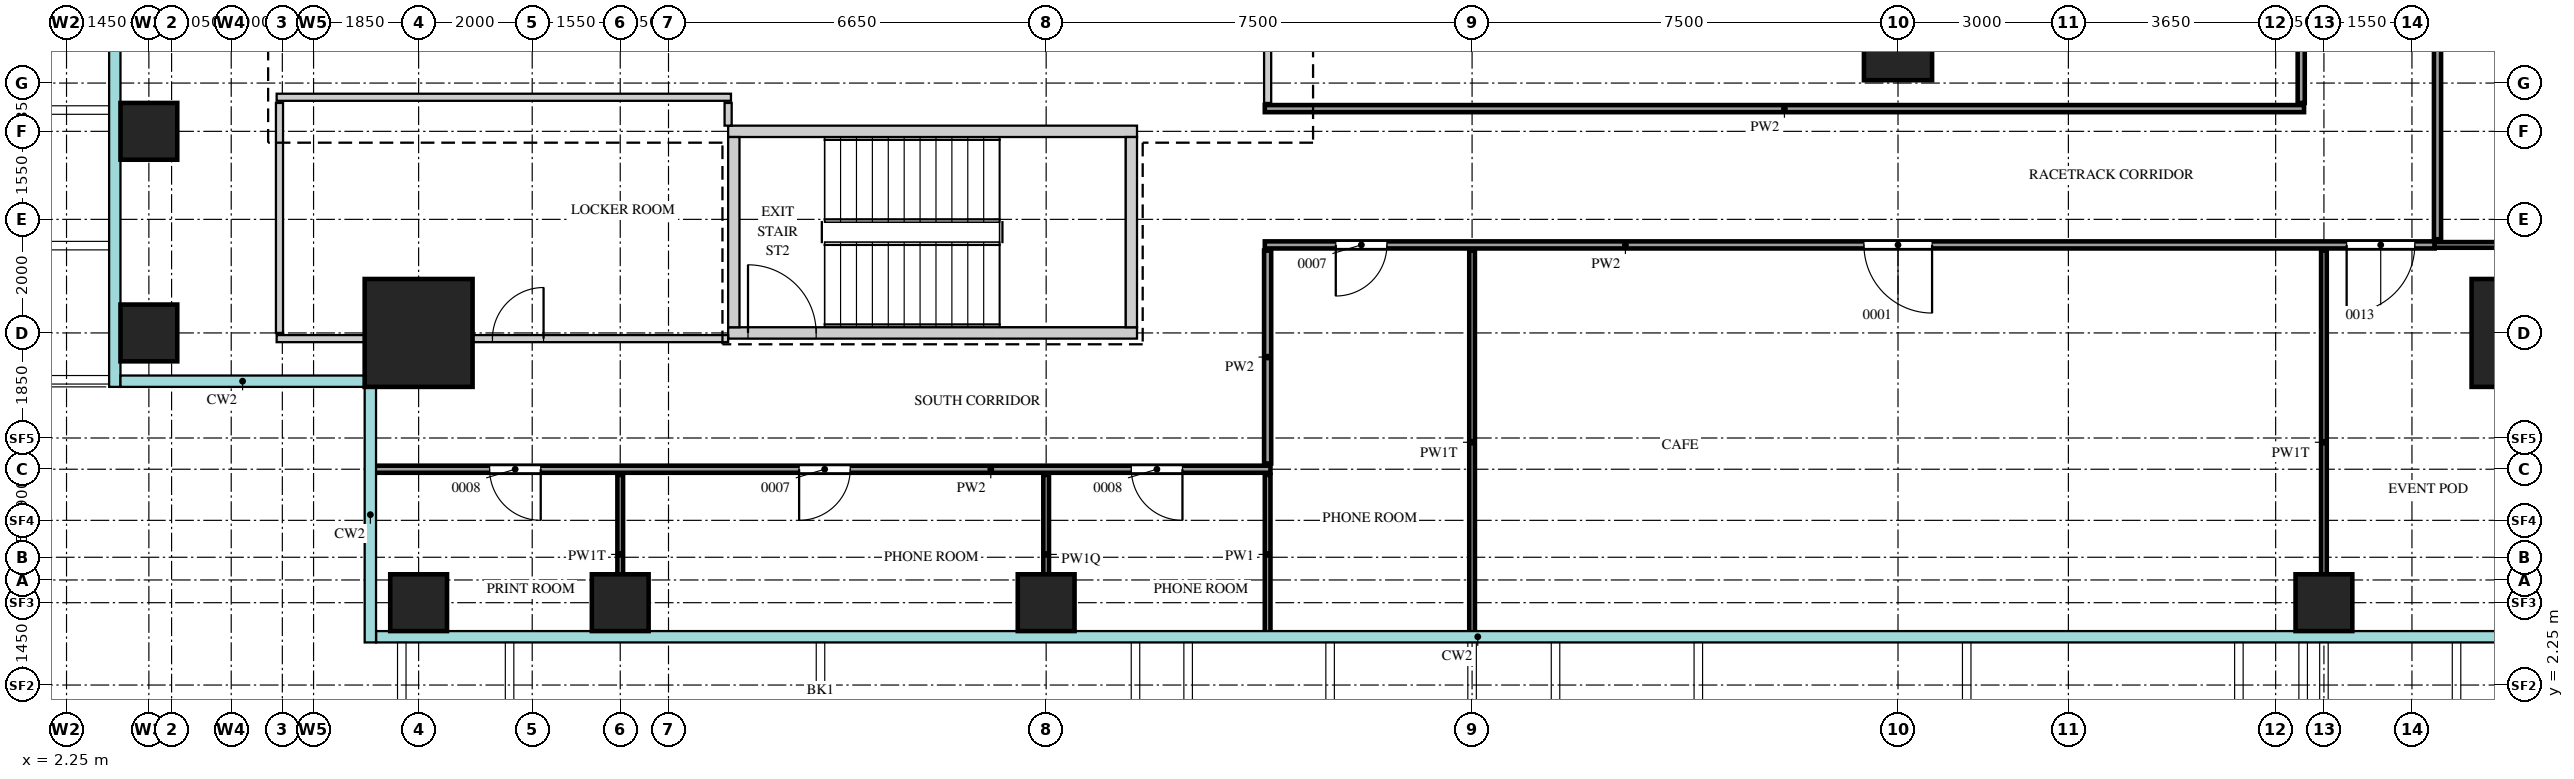
"""IFC4 building model, lengths in metres.
Left out: names, types, materials, properties, quantities, classifications, styles, units other than length and angle.
Written with IfcOpenShell. Run it as: python <this file> out.ifc"""

import sys

from ifc_helpers import new_model, si_unit, direction, frame, frame_2d, origin, origin_2d, place, context, subcontext, project, spatial, rectangle, extrude, source, transform, mapped, element, fill, save


model = new_model("IFC4")
c1 = context("Model", 3, precision=1e-05, world=origin(), true_north=direction((0.0, 1.0)))
c2 = subcontext(c1, "Body", "Model", "MODEL_VIEW")
j1 = project(units=[si_unit("LENGTHUNIT", "METRE"), si_unit("PLANEANGLEUNIT", "RADIAN")], contexts=[c1])
p1 = place(None, origin())
s1 = spatial("IfcSite", under=j1, at=p1, CompositionType="ELEMENT")
p2 = place(p1, origin())
s2 = spatial("IfcBuilding", under=s1, at=p2, CompositionType="ELEMENT")
p3 = place(p2, frame((0.0, 0.0, 188.7)))
s3 = spatial("IfcBuildingStorey", under=s2, at=p3, CompositionType="ELEMENT", Elevation=188.7)
m1 = source(origin(), c2, "Body", "SweptSolid", [
    extrude(rectangle(XDim=7.2, YDim=0.2, at=frame_2d((3.6, 0.0))), origin(), (0.0, 0.0, 1.0), 3.75),
])
p4 = place(p3, frame((13.9, 12.0, 0.0), z_axis=(0.0, 0.0, 1.0), x_axis=(1.0, 0.0, 0.0)))
e1 = element("IfcWall", 1, at=p4, inside=s3, PredefinedType="SHEAR", context=c2, shape_type="MappedRepresentation", body=[
    mapped(m1, transform((0.0, 0.0, 0.0))),
])
p5 = place(p3, frame((13.9, 8.45, 0.0), z_axis=(0.0, 0.0, 1.0), x_axis=(1.0, 0.0, 0.0)))
e2 = element("IfcWall", 2, at=p5, inside=s3, PredefinedType="SHEAR", context=c2, shape_type="MappedRepresentation", body=[
    mapped(m1, transform((0.0, 0.0, 0.0))),
])
m2 = source(origin(), c2, "Body", "SweptSolid", [
    extrude(rectangle(XDim=1.2, YDim=2.1, at=frame_2d((0.6, 1.05))), frame((0.0, 0.11, 0.0), z_axis=(0.0, -1.0, 0.0), x_axis=(1.0, 0.0, 0.0)), (0.0, 0.0, 1.0), 0.22),
])
p6 = place(p5, frame((0.35, 0.0, 0.0)))
e3 = element("IfcOpeningElement", 3, at=p6, cuts=e2, PredefinedType="OPENING", context=c2, shape_type="MappedRepresentation", body=[
    mapped(m2, transform((0.0, 0.0, 0.0))),
])
m3 = source(origin(), c2, "Body", "SweptSolid", [
    extrude(rectangle(XDim=3.35, YDim=0.2, at=frame_2d((1.675, 0.0))), origin(), (0.0, 0.0, 1.0), 3.75),
])
for number, where, z_axis, x_axis in (
    (4, (21.0, 8.55, 0.0), (0.0, 0.0, 1.0), (0.0, 1.0, 0.0)),
    (5, (14.0, 8.55, 0.0), (0.0, 0.0, 1.0), (0.0, 1.0, 0.0)),
):
    element("IfcWall", number, at=place(p3, frame(where, z_axis=z_axis, x_axis=x_axis)), inside=s3, PredefinedType="SHEAR", context=c2, shape_type="MappedRepresentation", body=[
        mapped(m3, transform((0.0, 0.0, 0.0))),
    ])
m4 = source(origin(), c2, "Body", "SweptSolid", [
    extrude(rectangle(XDim=1.9, YDim=1.9, at=origin_2d()), origin(), (0.0, 0.0, 1.0), 4.0),
])
for number, where, z_axis, x_axis in (
    (6, (45.55, 8.45, 0.0), (0.0, 0.0, 1.0), (1.0, 0.0, 0.0)),
    (7, (8.45, 8.45, 0.0), (0.0, 0.0, 1.0), (1.0, 0.0, 0.0)),
):
    element("IfcColumn", number, at=place(p3, frame(where, z_axis=z_axis, x_axis=x_axis)), inside=s3, PredefinedType="COLUMN", context=c2, shape_type="MappedRepresentation", body=[
        mapped(m4, transform((0.0, 0.0, 0.0))),
    ])
m5 = source(origin(), c2, "Body", "SweptSolid", [
    extrude(rectangle(XDim=1.0, YDim=1.0, at=origin_2d()), origin(), (0.0, 0.0, 1.0), 3.75),
])
for number, where, z_axis, x_axis in (
    (8, (8.45, 3.7, 0.0), (0.0, 0.0, 1.0), (1.0, 0.0, 0.0)),
    (9, (12.0, 3.7, 0.0), (0.0, 0.0, 1.0), (1.0, 0.0, 0.0)),
    (10, (19.5, 3.7, 0.0), (0.0, 0.0, 1.0), (1.0, 0.0, 0.0)),
    (11, (42.0, 3.7, 0.0), (0.0, 0.0, 1.0), (1.0, 0.0, 0.0)),
    (12, (3.7, 8.45, 0.0), (0.0, 0.0, 1.0), (1.0, 0.0, 0.0)),
    (13, (3.7, 12.0, 0.0), (0.0, 0.0, 1.0), (1.0, 0.0, 0.0)),
):
    element("IfcColumn", number, at=place(p3, frame(where, z_axis=z_axis, x_axis=x_axis)), inside=s3, PredefinedType="COLUMN", context=c2, shape_type="MappedRepresentation", body=[
        mapped(m5, transform((0.0, 0.0, 0.0))),
    ])
m6 = source(origin(), c2, "Body", "SweptSolid", [
    extrude(rectangle(XDim=1.2, YDim=1.2, at=origin_2d()), origin(), (0.0, 0.0, 1.0), 3.75),
])
p7 = place(p3, frame((34.5, 13.5, 0.0), z_axis=(0.0, 0.0, 1.0), x_axis=(1.0, 0.0, 0.0)))
e14 = element("IfcColumn", 14, at=p7, inside=s3, PredefinedType="COLUMN", context=c2, shape_type="MappedRepresentation", body=[
    mapped(m6, transform((0.0, 0.0, 0.0))),
])
m7 = source(origin(), c2, "Body", "SweptSolid", [
    extrude(rectangle(XDim=2.8, YDim=0.1, at=frame_2d((1.4, 0.0))), origin(), (0.0, 0.0, 1.0), 3.3),
])
p8 = place(p3, frame((12.0, 3.15, 0.0), z_axis=(0.0, 0.0, 1.0), x_axis=(0.0, 1.0, 0.0)))
e15 = element("IfcWall", 15, at=p8, inside=s3, PredefinedType="PARTITIONING", context=c2, shape_type="MappedRepresentation", body=[
    mapped(m7, transform((0.0, 0.0, 0.0))),
])
m8 = source(origin(), c2, "Body", "SweptSolid", [
    extrude(rectangle(XDim=2.8, YDim=0.1, at=frame_2d((1.4, 0.0))), origin(), (0.0, 0.0, 1.0), 3.42),
])
p9 = place(p3, frame((19.5, 3.15, 0.0), z_axis=(0.0, 0.0, 1.0), x_axis=(0.0, 1.0, 0.0)))
e16 = element("IfcWall", 16, at=p9, inside=s3, PredefinedType="PARTITIONING", context=c2, shape_type="MappedRepresentation", body=[
    mapped(m8, transform((0.0, 0.0, 0.0))),
])
m9 = source(origin(), c2, "Body", "SweptSolid", [
    extrude(rectangle(XDim=2.8, YDim=0.1, at=frame_2d((1.4, 0.0))), origin(), (0.0, 0.0, 1.0), 3.8),
])
p10 = place(p3, frame((23.4, 3.15, 0.0), z_axis=(0.0, 0.0, 1.0), x_axis=(0.0, 1.0, 0.0)))
e17 = element("IfcWall", 17, at=p10, inside=s3, PredefinedType="PARTITIONING", context=c2, shape_type="MappedRepresentation", body=[
    mapped(m9, transform((0.0, 0.0, 0.0))),
])
m10 = source(origin(), c2, "Body", "SweptSolid", [
    extrude(rectangle(XDim=6.75, YDim=0.1, at=frame_2d((3.375, 0.0))), origin(), (0.0, 0.0, 1.0), 3.3),
])
for number, where, z_axis, x_axis in (
    (18, (27.0, 3.15, 0.0), (0.0, 0.0, 1.0), (0.0, 1.0, 0.0)),
    (19, (42.0, 3.15, 0.0), (0.0, 0.0, 1.0), (0.0, 1.0, 0.0)),
):
    element("IfcWall", number, at=place(p3, frame(where, z_axis=z_axis, x_axis=x_axis)), inside=s3, PredefinedType="PARTITIONING", context=c2, shape_type="MappedRepresentation", body=[
        mapped(m10, transform((0.0, 0.0, 0.0))),
    ])
m11 = source(origin(), c2, "Body", "SweptSolid", [
    extrude(rectangle(XDim=15.8, YDim=0.125, at=frame_2d((7.9, 0.0))), origin(), (0.0, 0.0, 1.0), 3.8),
])
p11 = place(p3, frame((7.65, 6.05, 0.0), z_axis=(0.0, 0.0, 1.0), x_axis=(1.0, 0.0, 0.0)))
e20 = element("IfcWall", 20, at=p11, inside=s3, PredefinedType="PARTITIONING", context=c2, shape_type="MappedRepresentation", body=[
    mapped(m11, transform((0.0, 0.0, 0.0))),
])
m12 = source(origin(), c2, "Body", "SweptSolid", [
    extrude(rectangle(XDim=0.9, YDim=2.1, at=frame_2d((0.45, 1.05))), frame((0.0, 0.073, 0.0), z_axis=(0.0, -1.0, 0.0), x_axis=(1.0, 0.0, 0.0)), (0.0, 0.0, 1.0), 0.145),
])
p12 = place(p11, frame((2.05, 0.0, 0.0)))
e21 = element("IfcOpeningElement", 21, at=p12, cuts=e20, PredefinedType="OPENING", context=c2, shape_type="MappedRepresentation", body=[
    mapped(m12, transform((0.0, 0.0, 0.0))),
])
p13 = place(p11, frame((7.5, 0.0, 0.0)))
e22 = element("IfcOpeningElement", 22, at=p13, cuts=e20, PredefinedType="OPENING", context=c2, shape_type="MappedRepresentation", body=[
    mapped(m12, transform((0.0, 0.0, 0.0))),
])
p14 = place(p11, frame((13.35, 0.0, 0.0)))
e23 = element("IfcOpeningElement", 23, at=p14, cuts=e20, PredefinedType="OPENING", context=c2, shape_type="MappedRepresentation", body=[
    mapped(m12, transform((0.0, 0.0, 0.0))),
])
m13 = source(origin(), c2, "Body", "SweptSolid", [
    extrude(rectangle(XDim=3.75, YDim=0.125, at=frame_2d((1.875, 0.0))), origin(), (0.0, 0.0, 1.0), 3.8),
])
p15 = place(p3, frame((23.4, 6.15, 0.0), z_axis=(0.0, 0.0, 1.0), x_axis=(0.0, 1.0, 0.0)))
e24 = element("IfcWall", 24, at=p15, inside=s3, PredefinedType="PARTITIONING", context=c2, shape_type="MappedRepresentation", body=[
    mapped(m13, transform((0.0, 0.0, 0.0))),
])
m14 = source(origin(), c2, "Body", "SweptSolid", [
    extrude(rectangle(XDim=7.95, YDim=0.125, at=frame_2d((3.975, 0.0))), origin(), (0.0, 0.0, 1.0), 3.25),
])
p16 = place(p3, frame((5.95, 8.35, 0.0), z_axis=(0.0, 0.0, 1.0), x_axis=(1.0, 0.0, 0.0)))
e25 = element("IfcWall", 25, at=p16, inside=s3, PredefinedType="PARTITIONING", context=c2, shape_type="MappedRepresentation", body=[
    mapped(m14, transform((0.0, 0.0, 0.0))),
])
p17 = place(p16, frame((3.8, 0.0, 0.0)))
e26 = element("IfcOpeningElement", 26, at=p17, cuts=e25, PredefinedType="OPENING", context=c2, shape_type="MappedRepresentation", body=[
    mapped(m12, transform((0.0, 0.0, 0.0))),
])
m15 = source(origin(), c2, "Body", "SweptSolid", [
    extrude(rectangle(XDim=4.05, YDim=0.125, at=frame_2d((2.025, 0.0))), origin(), (0.0, 0.0, 1.0), 3.8),
])
p18 = place(p3, frame((6.0, 8.45, 0.0), z_axis=(0.0, 0.0, 1.0), x_axis=(0.0, 1.0, 0.0)))
e27 = element("IfcWall", 27, at=p18, inside=s3, PredefinedType="PARTITIONING", context=c2, shape_type="MappedRepresentation", body=[
    mapped(m15, transform((0.0, 0.0, 0.0))),
])
m16 = source(origin(), c2, "Body", "SweptSolid", [
    extrude(rectangle(XDim=20.6, YDim=0.125, at=frame_2d((10.3, 0.0))), origin(), (0.0, 0.0, 1.0), 3.8),
])
p19 = place(p3, frame((23.35, 10.0, 0.0), z_axis=(0.0, 0.0, 1.0), x_axis=(1.0, 0.0, 0.0)))
e28 = element("IfcWall", 28, at=p19, inside=s3, PredefinedType="PARTITIONING", context=c2, shape_type="MappedRepresentation", body=[
    mapped(m16, transform((0.0, 0.0, 0.0))),
])
p20 = place(p19, frame((1.25, 0.0, 0.0)))
e29 = element("IfcOpeningElement", 29, at=p20, cuts=e28, PredefinedType="OPENING", context=c2, shape_type="MappedRepresentation", body=[
    mapped(m12, transform((0.0, 0.0, 0.0))),
])
m17 = source(origin(), c2, "Body", "SweptSolid", [
    extrude(rectangle(XDim=1.2, YDim=2.1, at=frame_2d((0.6, 1.05))), frame((0.0, 0.073, 0.0), z_axis=(0.0, -1.0, 0.0), x_axis=(1.0, 0.0, 0.0)), (0.0, 0.0, 1.0), 0.145),
])
p21 = place(p19, frame((10.55, 0.0, 0.0)))
e30 = element("IfcOpeningElement", 30, at=p21, cuts=e28, PredefinedType="OPENING", context=c2, shape_type="MappedRepresentation", body=[
    mapped(m17, transform((0.0, 0.0, 0.0))),
])
p22 = place(p19, frame((19.05, 0.0, 0.0)))
e31 = element("IfcOpeningElement", 31, at=p22, cuts=e28, PredefinedType="OPENING", context=c2, shape_type="MappedRepresentation", body=[
    mapped(m17, transform((0.0, 0.0, 0.0))),
])
m18 = source(origin(), c2, "Body", "SweptSolid", [
    extrude(rectangle(XDim=6.9, YDim=0.1, at=frame_2d((3.45, 0.0))), origin(), (0.0, 0.0, 1.0), 3.8),
])
p23 = place(p3, frame((43.95, 10.0, 0.0), z_axis=(0.0, 0.0, 1.0), x_axis=(1.0, 0.0, 0.0)))
e32 = element("IfcWall", 32, at=p23, inside=s3, PredefinedType="PARTITIONING", context=c2, shape_type="MappedRepresentation", body=[
    mapped(m18, transform((0.0, 0.0, 0.0))),
])
m19 = source(origin(), c2, "Body", "SweptSolid", [
    extrude(rectangle(XDim=33.8, YDim=0.125, at=frame_2d((16.9, 0.0))), origin(), (0.0, 0.0, 1.0), 3.8),
])
p24 = place(p3, frame((44.0, 10.1, 0.0), z_axis=(0.0, 0.0, 1.0), x_axis=(0.0, 1.0, 0.0)))
e33 = element("IfcWall", 33, at=p24, inside=s3, PredefinedType="PARTITIONING", context=c2, shape_type="MappedRepresentation", body=[
    mapped(m19, transform((0.0, 0.0, 0.0))),
])
p25 = place(p24, frame((5.25, 0.0, 0.0)))
e34 = element("IfcOpeningElement", 34, at=p25, cuts=e33, PredefinedType="OPENING", context=c2, shape_type="MappedRepresentation", body=[
    mapped(m12, transform((0.0, 0.0, 0.0))),
])
p26 = place(p24, frame((12.55, 0.0, 0.0)))
e35 = element("IfcOpeningElement", 35, at=p26, cuts=e33, PredefinedType="OPENING", context=c2, shape_type="MappedRepresentation", body=[
    mapped(m12, transform((0.0, 0.0, 0.0))),
])
p27 = place(p24, frame((23.6, 0.0, 0.0)))
e36 = element("IfcOpeningElement", 36, at=p27, cuts=e33, PredefinedType="OPENING", context=c2, shape_type="MappedRepresentation", body=[
    mapped(m12, transform((0.0, 0.0, 0.0))),
])
p28 = place(p24, frame((32.3, 0.0, 0.0)))
e37 = element("IfcOpeningElement", 37, at=p28, cuts=e33, PredefinedType="OPENING", context=c2, shape_type="MappedRepresentation", body=[
    mapped(m12, transform((0.0, 0.0, 0.0))),
])
m20 = source(origin(), c2, "Body", "SweptSolid", [
    extrude(rectangle(XDim=0.4, YDim=0.125, at=frame_2d((0.2, 0.0))), origin(), (0.0, 0.0, 1.0), 3.8),
])
p29 = place(p3, frame((13.9, 12.1, 0.0), z_axis=(0.0, 0.0, 1.0), x_axis=(0.0, 1.0, 0.0)))
e38 = element("IfcWall", 38, at=p29, inside=s3, PredefinedType="PARTITIONING", context=c2, shape_type="MappedRepresentation", body=[
    mapped(m20, transform((0.0, 0.0, 0.0))),
])
m21 = source(origin(), c2, "Body", "SweptSolid", [
    extrude(rectangle(XDim=18.3, YDim=0.125, at=frame_2d((9.15, 0.0))), origin(), (0.0, 0.0, 1.0), 3.8),
])
p30 = place(p3, frame((23.35, 12.4, 0.0), z_axis=(0.0, 0.0, 1.0), x_axis=(1.0, 0.0, 0.0)))
e39 = element("IfcWall", 39, at=p30, inside=s3, PredefinedType="PARTITIONING", context=c2, shape_type="MappedRepresentation", body=[
    mapped(m21, transform((0.0, 0.0, 0.0))),
])
m22 = source(origin(), c2, "Body", "SweptSolid", [
    extrude(rectangle(XDim=23.4, YDim=0.125, at=frame_2d((11.7, 0.0))), origin(), (0.0, 0.0, 1.0), 3.8),
])
p31 = place(p3, frame((23.4, 12.5, 0.0), z_axis=(0.0, 0.0, 1.0), x_axis=(0.0, 1.0, 0.0)))
e40 = element("IfcWall", 40, at=p31, inside=s3, PredefinedType="PARTITIONING", context=c2, shape_type="MappedRepresentation", body=[
    mapped(m22, transform((0.0, 0.0, 0.0))),
])
p32 = place(p31, frame((6.6, 0.0, 0.0)))
e41 = element("IfcOpeningElement", 41, at=p32, cuts=e40, PredefinedType="OPENING", context=c2, shape_type="MappedRepresentation", body=[
    mapped(m17, transform((0.0, 0.0, 0.0))),
])
m23 = source(origin(), c2, "Body", "SweptSolid", [
    extrude(rectangle(XDim=29.0, YDim=0.125, at=frame_2d((14.5, 0.0))), origin(), (0.0, 0.0, 1.0), 3.8),
])
p33 = place(p3, frame((41.6, 12.5, 0.0), z_axis=(0.0, 0.0, 1.0), x_axis=(0.0, 1.0, 0.0)))
e42 = element("IfcWall", 42, at=p33, inside=s3, PredefinedType="PARTITIONING", context=c2, shape_type="MappedRepresentation", body=[
    mapped(m23, transform((0.0, 0.0, 0.0))),
])
p34 = place(p33, frame((18.4, 0.0, 0.0)))
e43 = element("IfcOpeningElement", 43, at=p34, cuts=e42, PredefinedType="OPENING", context=c2, shape_type="MappedRepresentation", body=[
    mapped(m17, transform((0.0, 0.0, 0.0))),
])
m24 = source(origin(), c2, "Body", "SweptSolid", [
    extrude(rectangle(XDim=8.0, YDim=0.125, at=frame_2d((4.0, 0.0))), origin(), (0.0, 0.0, 1.0), 3.8),
])
p35 = place(p3, frame((5.95, 12.6, 0.0), z_axis=(0.0, 0.0, 1.0), x_axis=(1.0, 0.0, 0.0)))
e44 = element("IfcWall", 44, at=p35, inside=s3, PredefinedType="PARTITIONING", context=c2, shape_type="MappedRepresentation", body=[
    mapped(m24, transform((0.0, 0.0, 0.0))),
])
m25 = source(origin(), c2, "Body", "SweptSolid", [
    extrude(rectangle(XDim=0.9, YDim=2.1, at=frame_2d((0.45, 1.05))), frame((0.0, 0.025, 0.0), z_axis=(0.0, -1.0, 0.0), x_axis=(1.0, 0.0, 0.0)), (0.0, 0.0, 1.0), 0.05),
])
p36 = place(p20, origin())
e45 = element("IfcDoor", 45, at=p36, inside=s3, OperationType="SINGLE_SWING_LEFT", PredefinedType="DOOR", context=c2, shape_type="MappedRepresentation", body=[
    mapped(m25, transform((0.0, 0.0, 0.0))),
])
fill(e29, e45)
m26 = source(origin(), c2, "Body", "SweptSolid", [
    extrude(rectangle(XDim=1.2, YDim=2.1, at=frame_2d((0.6, 1.05))), frame((0.0, 0.025, 0.0), z_axis=(0.0, -1.0, 0.0), x_axis=(1.0, 0.0, 0.0)), (0.0, 0.0, 1.0), 0.05),
])
p37 = place(p21, origin())
e46 = element("IfcDoor", 46, at=p37, inside=s3, OperationType="SINGLE_SWING_RIGHT", PredefinedType="DOOR", context=c2, shape_type="MappedRepresentation", body=[
    mapped(m26, transform((0.0, 0.0, 0.0))),
])
fill(e30, e46)
p38 = place(p22, origin())
e47 = element("IfcDoor", 47, at=p38, inside=s3, OperationType="SINGLE_SWING_LEFT", PredefinedType="DOOR", context=c2, shape_type="MappedRepresentation", body=[
    mapped(m26, transform((0.0, 0.0, 0.0))),
])
fill(e31, e47)
p39 = place(p17, origin())
e48 = element("IfcDoor", 48, at=p39, inside=s3, OperationType="SINGLE_SWING_LEFT", PredefinedType="DOOR", context=c2, shape_type="MappedRepresentation", body=[
    mapped(m25, transform((0.0, 0.0, 0.0))),
])
fill(e26, e48)
p40 = place(p12, origin())
e49 = element("IfcDoor", 49, at=p40, inside=s3, OperationType="SINGLE_SWING_RIGHT", PredefinedType="DOOR", context=c2, shape_type="MappedRepresentation", body=[
    mapped(m25, transform((0.0, 0.0, 0.0))),
])
fill(e21, e49)
p41 = place(p13, origin())
e50 = element("IfcDoor", 50, at=p41, inside=s3, OperationType="SINGLE_SWING_LEFT", PredefinedType="DOOR", context=c2, shape_type="MappedRepresentation", body=[
    mapped(m25, transform((0.0, 0.0, 0.0))),
])
fill(e22, e50)
p42 = place(p14, origin())
e51 = element("IfcDoor", 51, at=p42, inside=s3, OperationType="SINGLE_SWING_RIGHT", PredefinedType="DOOR", context=c2, shape_type="MappedRepresentation", body=[
    mapped(m25, transform((0.0, 0.0, 0.0))),
])
fill(e23, e51)
p43 = place(p6, origin())
e52 = element("IfcDoor", 52, at=p43, inside=s3, OperationType="SINGLE_SWING_RIGHT", PredefinedType="DOOR", context=c2, shape_type="MappedRepresentation", body=[
    mapped(m26, transform((0.0, 0.0, 0.0))),
])
fill(e3, e52)
save(model, sys.argv[1])
